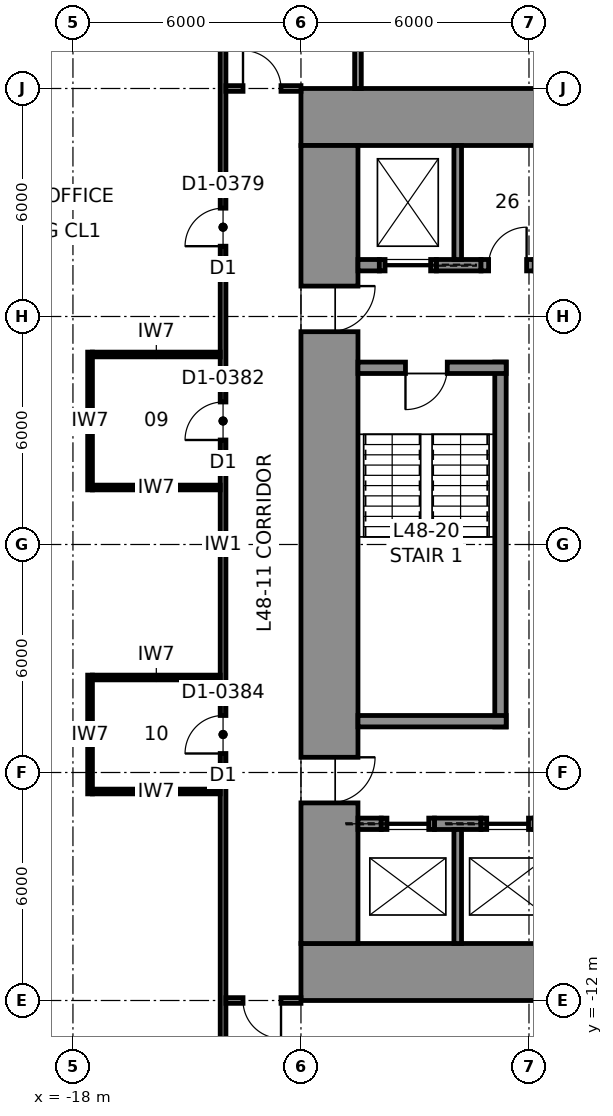
"""IFC4 building model, lengths in metres.
Left out: names, types, materials, properties, quantities, classifications, styles, units other than length and angle.
Written with IfcOpenShell. Run it as: python <this file> out.ifc"""

import sys

from ifc_helpers import new_model, si_unit, direction, frame, frame_2d, origin, place, context, subcontext, project, spatial, rectangle, extrude, element, fill, save


model = new_model("IFC4")
c1 = context("Model", 3, precision=1e-05, world=origin(), true_north=direction((0.0, 1.0)))
c2 = subcontext(c1, "Body", "Model", "MODEL_VIEW")
j1 = project(units=[si_unit("LENGTHUNIT", "METRE"), si_unit("PLANEANGLEUNIT", "RADIAN")], contexts=[c1])
p1 = place(None, origin())
s1 = spatial("IfcSite", under=j1, at=p1, CompositionType="ELEMENT")
p2 = place(p1, origin())
s2 = spatial("IfcBuilding", under=s1, at=p2, CompositionType="ELEMENT")
p3 = place(p2, frame((0.0, 0.0, 221.8)))
s3 = spatial("IfcBuildingStorey", under=s2, at=p3, CompositionType="ELEMENT", Elevation=221.8)
for number, where, z_axis, x_axis in (
    (1, (-12.0, 11.25, 0.0), (0.0, 0.0, 1.0), (1.0, 0.0, 0.0)),
    (2, (12.0, -11.25, 0.0), (0.0, 0.0, 1.0), (-1.0, 0.0, 0.0)),
):
    element("IfcWall", number, at=place(p3, frame(where, z_axis=z_axis, x_axis=x_axis)), inside=s3, PredefinedType="SHEAR", context=c2, shape_type="SweptSolid", body=[
        extrude(rectangle(XDim=24.0, YDim=1.5, at=frame_2d((12.0, 0.0))), origin(), (0.0, 0.0, 1.0), 4.0),
    ])
p4 = place(p3, frame((-11.25, -10.5, 0.0), z_axis=(0.0, 0.0, 1.0), x_axis=(0.0, 1.0, 0.0)))
e3 = element("IfcWall", 3, at=p4, inside=s3, PredefinedType="SHEAR", context=c2, shape_type="SweptSolid", body=[
    extrude(rectangle(XDim=21.0, YDim=1.5, at=frame_2d((10.5, 0.0))), origin(), (0.0, 0.0, 1.0), 4.0),
])
p5 = place(p4, frame((16.1, 0.0, 0.0)))
e4 = element("IfcOpeningElement", 4, at=p5, cuts=e3, PredefinedType="OPENING", context=c2, shape_type="SweptSolid", body=[
    extrude(rectangle(XDim=1.2, YDim=2.3, at=frame_2d((0.6, 1.15))), frame((0.0, 0.76, 0.0), z_axis=(0.0, -1.0, 0.0), x_axis=(1.0, 0.0, 0.0)), (0.0, 0.0, 1.0), 1.52),
])
p6 = place(p4, frame((3.7, 0.0, 0.0)))
e5 = element("IfcOpeningElement", 5, at=p6, cuts=e3, PredefinedType="OPENING", context=c2, shape_type="SweptSolid", body=[
    extrude(rectangle(XDim=1.2, YDim=2.3, at=frame_2d((0.6, 1.15))), frame((0.0, 0.76, 0.0), z_axis=(0.0, -1.0, 0.0), x_axis=(1.0, 0.0, 0.0)), (0.0, 0.0, 1.0), 1.52),
])
p7 = place(p3, frame((-10.5, 7.35, 0.0), z_axis=(0.0, 0.0, 1.0), x_axis=(1.0, 0.0, 0.0)))
e6 = element("IfcWall", 6, at=p7, inside=s3, PredefinedType="SHEAR", context=c2, shape_type="SweptSolid", body=[
    extrude(rectangle(XDim=0.562, YDim=0.3, at=frame_2d((0.281, 0.0))), origin(), (0.0, 0.0, 1.0), 4.0),
])
p8 = place(p3, frame((-8.438, 7.35, 0.0), z_axis=(0.0, 0.0, 1.0), x_axis=(1.0, 0.0, 0.0)))
e7 = element("IfcWall", 7, at=p8, inside=s3, PredefinedType="SHEAR", context=c2, shape_type="SweptSolid", body=[
    extrude(rectangle(XDim=1.175, YDim=0.3, at=frame_2d((0.587, 0.0))), origin(), (0.0, 0.0, 1.0), 4.0),
])
p9 = place(p3, frame((-9.938, 7.35, 0.0), z_axis=(0.0, 0.0, 1.0), x_axis=(1.0, 0.0, 0.0)))
e8 = element("IfcWall", 8, at=p9, inside=s3, PredefinedType="PARTITIONING", context=c2, shape_type="SweptSolid", body=[
    extrude(rectangle(XDim=1.5, YDim=0.3, at=frame_2d((0.75, 0.0))), origin(), (0.0, 0.0, 1.0), 4.0),
])
p10 = place(p9, frame((0.15, 0.0, 0.0)))
e9 = element("IfcOpeningElement", 9, at=p10, cuts=e8, PredefinedType="OPENING", context=c2, shape_type="SweptSolid", body=[
    extrude(rectangle(XDim=1.2, YDim=2.3, at=frame_2d((0.6, 1.15))), frame((0.0, 0.16, 0.0), z_axis=(0.0, -1.0, 0.0), x_axis=(1.0, 0.0, 0.0)), (0.0, 0.0, 1.0), 0.32),
])
p11 = place(p3, frame((-7.262, 7.35, 0.0), z_axis=(0.0, 0.0, 1.0), x_axis=(1.0, 0.0, 0.0)))
e10 = element("IfcWall", 10, at=p11, inside=s3, PredefinedType="PARTITIONING", context=c2, shape_type="SweptSolid", body=[
    extrude(rectangle(XDim=1.4, YDim=0.3, at=frame_2d((0.7, 0.0))), origin(), (0.0, 0.0, 1.0), 4.0),
])
p12 = place(p11, frame((0.2, 0.0, 0.0)))
e11 = element("IfcOpeningElement", 11, at=p12, cuts=e10, PredefinedType="OPENING", context=c2, shape_type="SweptSolid", body=[
    extrude(rectangle(XDim=1.0, YDim=2.3, at=frame_2d((0.5, 1.15))), frame((0.0, 0.16, 0.0), z_axis=(0.0, -1.0, 0.0), x_axis=(1.0, 0.0, 0.0)), (0.0, 0.0, 1.0), 0.32),
])
p13 = place(p3, frame((-7.875, 7.5, 0.0), z_axis=(0.0, 0.0, 1.0), x_axis=(0.0, 1.0, 0.0)))
e12 = element("IfcWall", 12, at=p13, inside=s3, PredefinedType="PARTITIONING", context=c2, shape_type="SweptSolid", body=[
    extrude(rectangle(XDim=3.0, YDim=0.2, at=frame_2d((1.5, 0.0))), origin(), (0.0, 0.0, 1.0), 4.0),
])
p14 = place(p3, frame((-10.5, -7.35, 0.0), z_axis=(0.0, 0.0, 1.0), x_axis=(1.0, 0.0, 0.0)))
e13 = element("IfcWall", 13, at=p14, inside=s3, PredefinedType="SHEAR", context=c2, shape_type="SweptSolid", body=[
    extrude(rectangle(XDim=0.613, YDim=0.3, at=frame_2d((0.306, 0.0))), origin(), (0.0, 0.0, 1.0), 4.0),
])
p15 = place(p3, frame((-8.488, -7.35, 0.0), z_axis=(0.0, 0.0, 1.0), x_axis=(1.0, 0.0, 0.0)))
e14 = element("IfcWall", 14, at=p15, inside=s3, PredefinedType="SHEAR", context=c2, shape_type="SweptSolid", body=[
    extrude(rectangle(XDim=1.225, YDim=0.3, at=frame_2d((0.613, 0.0))), origin(), (0.0, 0.0, 1.0), 4.0),
])
p16 = place(p3, frame((-9.887, -7.35, 0.0), z_axis=(0.0, 0.0, 1.0), x_axis=(1.0, 0.0, 0.0)))
e15 = element("IfcWall", 15, at=p16, inside=s3, PredefinedType="PARTITIONING", context=c2, shape_type="SweptSolid", body=[
    extrude(rectangle(XDim=1.4, YDim=0.3, at=frame_2d((0.7, 0.0))), origin(), (0.0, 0.0, 1.0), 4.0),
])
p17 = place(p16, frame((0.15, 0.0, 0.0)))
e16 = element("IfcOpeningElement", 16, at=p17, cuts=e15, PredefinedType="OPENING", context=c2, shape_type="SweptSolid", body=[
    extrude(rectangle(XDim=1.1, YDim=2.3, at=frame_2d((0.55, 1.15))), frame((0.0, 0.16, 0.0), z_axis=(0.0, -1.0, 0.0), x_axis=(1.0, 0.0, 0.0)), (0.0, 0.0, 1.0), 0.32),
])
p18 = place(p3, frame((-7.262, -7.35, 0.0), z_axis=(0.0, 0.0, 1.0), x_axis=(1.0, 0.0, 0.0)))
e17 = element("IfcWall", 17, at=p18, inside=s3, PredefinedType="PARTITIONING", context=c2, shape_type="SweptSolid", body=[
    extrude(rectangle(XDim=1.4, YDim=0.3, at=frame_2d((0.7, 0.0))), origin(), (0.0, 0.0, 1.0), 4.0),
])
p19 = place(p18, frame((0.15, 0.0, 0.0)))
e18 = element("IfcOpeningElement", 18, at=p19, cuts=e17, PredefinedType="OPENING", context=c2, shape_type="SweptSolid", body=[
    extrude(rectangle(XDim=1.1, YDim=2.3, at=frame_2d((0.55, 1.15))), frame((0.0, 0.16, 0.0), z_axis=(0.0, -1.0, 0.0), x_axis=(1.0, 0.0, 0.0)), (0.0, 0.0, 1.0), 0.32),
])
p20 = place(p3, frame((-7.875, -10.5, 0.0), z_axis=(0.0, 0.0, 1.0), x_axis=(0.0, 1.0, 0.0)))
e19 = element("IfcWall", 19, at=p20, inside=s3, PredefinedType="PARTITIONING", context=c2, shape_type="SweptSolid", body=[
    extrude(rectangle(XDim=3.0, YDim=0.2, at=frame_2d((1.5, 0.0))), origin(), (0.0, 0.0, 1.0), 4.0),
])
p21 = place(p3, frame((-14.05, 13.575, 0.0), z_axis=(0.0, 0.0, 1.0), x_axis=(0.0, -1.0, 0.0)))
e20 = element("IfcWall", 20, at=p21, inside=s3, PredefinedType="PARTITIONING", context=c2, shape_type="SweptSolid", body=[
    extrude(rectangle(XDim=27.15, YDim=0.15, at=frame_2d((13.575, 0.0))), origin(), (0.0, 0.0, 1.0), 3.83),
])
p22 = place(p21, frame((4.725, 0.0, 0.0)))
e21 = element("IfcOpeningElement", 21, at=p22, cuts=e20, PredefinedType="OPENING", context=c2, shape_type="SweptSolid", body=[
    extrude(rectangle(XDim=1.0, YDim=2.3, at=frame_2d((0.5, 1.15))), frame((0.0, 0.085, 0.0), z_axis=(0.0, -1.0, 0.0), x_axis=(1.0, 0.0, 0.0)), (0.0, 0.0, 1.0), 0.17),
])
p23 = place(p21, frame((9.825, 0.0, 0.0)))
e22 = element("IfcOpeningElement", 22, at=p23, cuts=e20, PredefinedType="OPENING", context=c2, shape_type="SweptSolid", body=[
    extrude(rectangle(XDim=1.0, YDim=2.3, at=frame_2d((0.5, 1.15))), frame((0.0, 0.085, 0.0), z_axis=(0.0, -1.0, 0.0), x_axis=(1.0, 0.0, 0.0)), (0.0, 0.0, 1.0), 0.17),
])
p24 = place(p21, frame((18.075, 0.0, 0.0)))
e23 = element("IfcOpeningElement", 23, at=p24, cuts=e20, PredefinedType="OPENING", context=c2, shape_type="SweptSolid", body=[
    extrude(rectangle(XDim=1.0, YDim=2.3, at=frame_2d((0.5, 1.15))), frame((0.0, 0.085, 0.0), z_axis=(0.0, -1.0, 0.0), x_axis=(1.0, 0.0, 0.0)), (0.0, 0.0, 1.0), 0.17),
])
p25 = place(p3, frame((-13.975, 12.0, 0.0), z_axis=(0.0, 0.0, 1.0), x_axis=(1.0, 0.0, 0.0)))
e24 = element("IfcWall", 24, at=p25, inside=s3, PredefinedType="PARTITIONING", context=c2, shape_type="SweptSolid", body=[
    extrude(rectangle(XDim=1.975, YDim=0.15, at=frame_2d((0.988, 0.0))), origin(), (0.0, 0.0, 1.0), 3.83),
])
p26 = place(p25, frame((0.45, 0.0, 0.0)))
e25 = element("IfcOpeningElement", 25, at=p26, cuts=e24, PredefinedType="OPENING", context=c2, shape_type="SweptSolid", body=[
    extrude(rectangle(XDim=1.0, YDim=2.3, at=frame_2d((0.5, 1.15))), frame((0.0, 0.085, 0.0), z_axis=(0.0, -1.0, 0.0), x_axis=(1.0, 0.0, 0.0)), (0.0, 0.0, 1.0), 0.17),
])
p27 = place(p3, frame((-12.0, -12.0, 0.0), z_axis=(0.0, 0.0, 1.0), x_axis=(-1.0, 0.0, 0.0)))
e26 = element("IfcWall", 26, at=p27, inside=s3, PredefinedType="PARTITIONING", context=c2, shape_type="SweptSolid", body=[
    extrude(rectangle(XDim=1.975, YDim=0.15, at=frame_2d((0.988, 0.0))), origin(), (0.0, 0.0, 1.0), 3.83),
])
p28 = place(p27, frame((0.525, 0.0, 0.0)))
e27 = element("IfcOpeningElement", 27, at=p28, cuts=e26, PredefinedType="OPENING", context=c2, shape_type="SweptSolid", body=[
    extrude(rectangle(XDim=1.0, YDim=2.3, at=frame_2d((0.5, 1.15))), frame((0.0, 0.085, 0.0), z_axis=(0.0, -1.0, 0.0), x_axis=(1.0, 0.0, 0.0)), (0.0, 0.0, 1.0), 0.17),
])
p29 = place(p3, frame((-10.5, 12.0, 0.0), z_axis=(0.0, 0.0, 1.0), x_axis=(0.0, 1.0, 0.0)))
e28 = element("IfcWall", 28, at=p29, inside=s3, PredefinedType="PARTITIONING", context=c2, shape_type="SweptSolid", body=[
    extrude(rectangle(XDim=11.15, YDim=0.175, at=frame_2d((5.575, 0.0))), origin(), (0.0, 0.0, 1.0), 3.83),
])
p30 = place(p3, frame((-17.55, 1.438, 0.0), z_axis=(0.0, 0.0, 1.0), x_axis=(0.0, 1.0, 0.0)))
e29 = element("IfcWall", 29, at=p30, inside=s3, PredefinedType="PARTITIONING", context=c2, shape_type="SweptSolid", body=[
    extrude(rectangle(XDim=3.625, YDim=0.125, at=frame_2d((1.812, 0.0))), origin(), (0.0, 0.0, 1.0), 3.83),
])
for number, where, z_axis, x_axis in (
    (30, (-14.125, 1.5, 0.0), (0.0, 0.0, 1.0), (-1.0, 0.0, 0.0)),
    (31, (-14.125, 5.0, 0.0), (0.0, 0.0, 1.0), (-1.0, 0.0, 0.0)),
):
    element("IfcWall", number, at=place(p3, frame(where, z_axis=z_axis, x_axis=x_axis)), inside=s3, PredefinedType="PARTITIONING", context=c2, shape_type="SweptSolid", body=[
        extrude(rectangle(XDim=3.363, YDim=0.125, at=frame_2d((1.681, 0.0))), origin(), (0.0, 0.0, 1.0), 3.83),
    ])
p31 = place(p3, frame((-17.55, -6.562, 0.0), z_axis=(0.0, 0.0, 1.0), x_axis=(0.0, 1.0, 0.0)))
e32 = element("IfcWall", 32, at=p31, inside=s3, PredefinedType="PARTITIONING", context=c2, shape_type="SweptSolid", body=[
    extrude(rectangle(XDim=3.125, YDim=0.125, at=frame_2d((1.562, 0.0))), origin(), (0.0, 0.0, 1.0), 3.83),
])
for number, where, z_axis, x_axis in (
    (33, (-14.125, -6.5, 0.0), (0.0, 0.0, 1.0), (-1.0, 0.0, 0.0)),
    (34, (-14.125, -3.5, 0.0), (0.0, 0.0, 1.0), (-1.0, 0.0, 0.0)),
):
    element("IfcWall", number, at=place(p3, frame(where, z_axis=z_axis, x_axis=x_axis)), inside=s3, PredefinedType="PARTITIONING", context=c2, shape_type="SweptSolid", body=[
        extrude(rectangle(XDim=3.363, YDim=0.125, at=frame_2d((1.681, 0.0))), origin(), (0.0, 0.0, 1.0), 3.83),
    ])
p32 = place(p3, frame((-6.75, -4.8, 0.0), z_axis=(0.0, 0.0, 1.0), x_axis=(0.0, 1.0, 0.0)))
e35 = element("IfcWall", 35, at=p32, inside=s3, PredefinedType="SOLIDWALL", context=c2, shape_type="SweptSolid", body=[
    extrude(rectangle(XDim=9.6, YDim=0.3, at=frame_2d((4.8, 0.0))), origin(), (0.0, 0.0, 1.0), 3.75),
])
p33 = place(p3, frame((-10.5, 4.65, 0.0), z_axis=(0.0, 0.0, 1.0), x_axis=(1.0, 0.0, 0.0)))
e36 = element("IfcWall", 36, at=p33, inside=s3, PredefinedType="SOLIDWALL", context=c2, shape_type="SweptSolid", body=[
    extrude(rectangle(XDim=3.9, YDim=0.3, at=frame_2d((1.95, 0.0))), origin(), (0.0, 0.0, 1.0), 3.75),
])
p34 = place(p33, frame((1.25, 0.0, 0.0)))
e37 = element("IfcOpeningElement", 37, at=p34, cuts=e36, PredefinedType="OPENING", context=c2, shape_type="SweptSolid", body=[
    extrude(rectangle(XDim=1.1, YDim=2.3, at=frame_2d((0.55, 1.15))), frame((0.0, 0.16, 0.0), z_axis=(0.0, -1.0, 0.0), x_axis=(1.0, 0.0, 0.0)), (0.0, 0.0, 1.0), 0.32),
])
p35 = place(p3, frame((-6.6, -4.65, 0.0), z_axis=(0.0, 0.0, 1.0), x_axis=(-1.0, 0.0, 0.0)))
e38 = element("IfcWall", 38, at=p35, inside=s3, PredefinedType="SOLIDWALL", context=c2, shape_type="SweptSolid", body=[
    extrude(rectangle(XDim=3.9, YDim=0.3, at=frame_2d((1.95, 0.0))), origin(), (0.0, 0.0, 1.0), 3.75),
])
p36 = place(p26, origin())
e39 = element("IfcDoor", 39, at=p36, inside=s3, OperationType="SINGLE_SWING_LEFT", PredefinedType="DOOR", context=c2, shape_type="SweptSolid", body=[
    extrude(rectangle(XDim=1.0, YDim=2.3, at=frame_2d((0.5, 1.15))), frame((0.0, 0.025, 0.0), z_axis=(0.0, -1.0, 0.0), x_axis=(1.0, 0.0, 0.0)), (0.0, 0.0, 1.0), 0.05),
])
fill(e25, e39)
p37 = place(p28, origin())
e40 = element("IfcDoor", 40, at=p37, inside=s3, OperationType="SINGLE_SWING_LEFT", PredefinedType="DOOR", context=c2, shape_type="SweptSolid", body=[
    extrude(rectangle(XDim=1.0, YDim=2.3, at=frame_2d((0.5, 1.15))), frame((0.0, 0.025, 0.0), z_axis=(0.0, -1.0, 0.0), x_axis=(1.0, 0.0, 0.0)), (0.0, 0.0, 1.0), 0.05),
])
fill(e27, e40)
p38 = place(p22, frame((1.0, 0.0, 0.0), z_axis=(0.0, 0.0, 1.0), x_axis=(-1.0, 0.0, 0.0)))
e41 = element("IfcDoor", 41, at=p38, inside=s3, OperationType="SINGLE_SWING_LEFT", PredefinedType="DOOR", context=c2, shape_type="SweptSolid", body=[
    extrude(rectangle(XDim=1.0, YDim=2.3, at=frame_2d((0.5, 1.15))), frame((0.0, 0.025, 0.0), z_axis=(0.0, -1.0, 0.0), x_axis=(1.0, 0.0, 0.0)), (0.0, 0.0, 1.0), 0.05),
])
fill(e21, e41)
p39 = place(p23, frame((1.0, 0.0, 0.0), z_axis=(0.0, 0.0, 1.0), x_axis=(-1.0, 0.0, 0.0)))
e42 = element("IfcDoor", 42, at=p39, inside=s3, OperationType="SINGLE_SWING_LEFT", PredefinedType="DOOR", context=c2, shape_type="SweptSolid", body=[
    extrude(rectangle(XDim=1.0, YDim=2.3, at=frame_2d((0.5, 1.15))), frame((0.0, 0.025, 0.0), z_axis=(0.0, -1.0, 0.0), x_axis=(1.0, 0.0, 0.0)), (0.0, 0.0, 1.0), 0.05),
])
fill(e22, e42)
p40 = place(p24, frame((1.0, 0.0, 0.0), z_axis=(0.0, 0.0, 1.0), x_axis=(-1.0, 0.0, 0.0)))
e43 = element("IfcDoor", 43, at=p40, inside=s3, OperationType="SINGLE_SWING_LEFT", PredefinedType="DOOR", context=c2, shape_type="SweptSolid", body=[
    extrude(rectangle(XDim=1.0, YDim=2.3, at=frame_2d((0.5, 1.15))), frame((0.0, 0.025, 0.0), z_axis=(0.0, -1.0, 0.0), x_axis=(1.0, 0.0, 0.0)), (0.0, 0.0, 1.0), 0.05),
])
fill(e23, e43)
p41 = place(p34, frame((1.1, 0.0, 0.0), z_axis=(0.0, 0.0, 1.0), x_axis=(-1.0, 0.0, 0.0)))
e44 = element("IfcDoor", 44, at=p41, inside=s3, OperationType="SINGLE_SWING_RIGHT", PredefinedType="DOOR", context=c2, shape_type="SweptSolid", body=[
    extrude(rectangle(XDim=1.1, YDim=2.3, at=frame_2d((0.55, 1.15))), frame((0.0, 0.025, 0.0), z_axis=(0.0, -1.0, 0.0), x_axis=(1.0, 0.0, 0.0)), (0.0, 0.0, 1.0), 0.05),
])
fill(e37, e44)
p42 = place(p12, origin())
e45 = element("IfcDoor", 45, at=p42, inside=s3, OperationType="SINGLE_SWING_RIGHT", PredefinedType="DOOR", context=c2, shape_type="SweptSolid", body=[
    extrude(rectangle(XDim=1.0, YDim=2.3, at=frame_2d((0.5, 1.15))), frame((0.0, 0.025, 0.0), z_axis=(0.0, -1.0, 0.0), x_axis=(1.0, 0.0, 0.0)), (0.0, 0.0, 1.0), 0.05),
])
fill(e11, e45)
p43 = place(p5, frame((1.2, 0.0, 0.0), z_axis=(0.0, 0.0, 1.0), x_axis=(-1.0, 0.0, 0.0)))
e46 = element("IfcDoor", 46, at=p43, inside=s3, OperationType="SINGLE_SWING_LEFT", PredefinedType="DOOR", context=c2, shape_type="SweptSolid", body=[
    extrude(rectangle(XDim=1.2, YDim=2.3, at=frame_2d((0.6, 1.15))), frame((0.0, 0.025, 0.0), z_axis=(0.0, -1.0, 0.0), x_axis=(1.0, 0.0, 0.0)), (0.0, 0.0, 1.0), 0.05),
])
fill(e4, e46)
p44 = place(p6, frame((1.2, 0.0, 0.0), z_axis=(0.0, 0.0, 1.0), x_axis=(-1.0, 0.0, 0.0)))
e47 = element("IfcDoor", 47, at=p44, inside=s3, OperationType="SINGLE_SWING_LEFT", PredefinedType="DOOR", context=c2, shape_type="SweptSolid", body=[
    extrude(rectangle(XDim=1.2, YDim=2.3, at=frame_2d((0.6, 1.15))), frame((0.0, 0.025, 0.0), z_axis=(0.0, -1.0, 0.0), x_axis=(1.0, 0.0, 0.0)), (0.0, 0.0, 1.0), 0.05),
])
fill(e5, e47)
p45 = place(p10, frame((1.2, 0.0, 0.0), z_axis=(0.0, 0.0, 1.0), x_axis=(-1.0, 0.0, 0.0)))
e48 = element("IfcDoor", 48, at=p45, inside=s3, OperationType="SLIDING_TO_LEFT", PredefinedType="DOOR", context=c2, shape_type="SweptSolid", body=[
    extrude(rectangle(XDim=1.2, YDim=2.3, at=frame_2d((0.6, 1.15))), frame((0.0, 0.025, 0.0), z_axis=(0.0, -1.0, 0.0), x_axis=(1.0, 0.0, 0.0)), (0.0, 0.0, 1.0), 0.05),
])
fill(e9, e48)
p46 = place(p19, origin())
e49 = element("IfcDoor", 49, at=p46, inside=s3, OperationType="SLIDING_TO_LEFT", PredefinedType="DOOR", context=c2, shape_type="SweptSolid", body=[
    extrude(rectangle(XDim=1.1, YDim=2.3, at=frame_2d((0.55, 1.15))), frame((0.0, 0.025, 0.0), z_axis=(0.0, -1.0, 0.0), x_axis=(1.0, 0.0, 0.0)), (0.0, 0.0, 1.0), 0.05),
])
fill(e18, e49)
p47 = place(p17, origin())
e50 = element("IfcDoor", 50, at=p47, inside=s3, OperationType="SLIDING_TO_LEFT", PredefinedType="DOOR", context=c2, shape_type="SweptSolid", body=[
    extrude(rectangle(XDim=1.1, YDim=2.3, at=frame_2d((0.55, 1.15))), frame((0.0, 0.025, 0.0), z_axis=(0.0, -1.0, 0.0), x_axis=(1.0, 0.0, 0.0)), (0.0, 0.0, 1.0), 0.05),
])
fill(e16, e50)
save(model, sys.argv[1])
